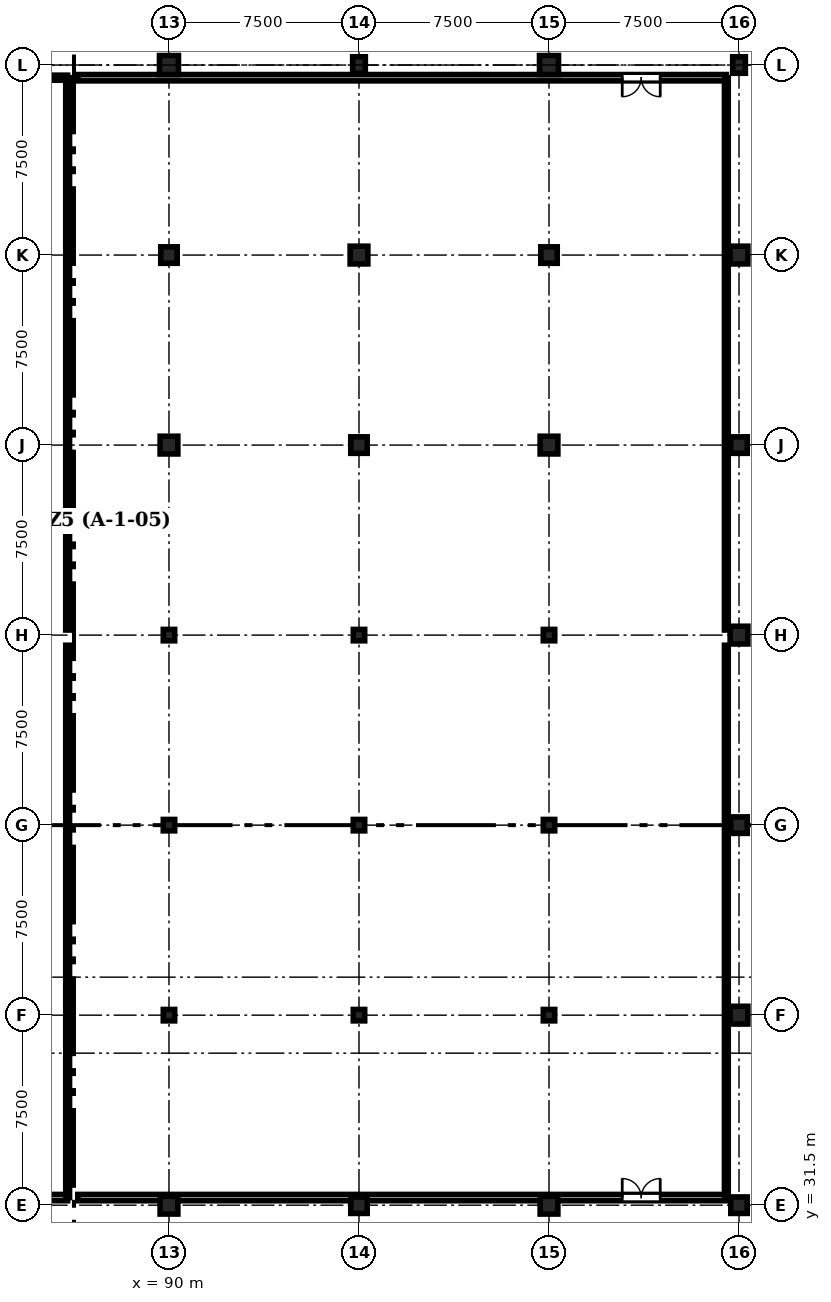
"""IFC4 building model, lengths in metres.
Left out: names, types, materials, properties, quantities, classifications, styles, units other than length and angle.
Written with IfcOpenShell. Run it as: python <this file> out.ifc"""

import sys

from ifc_helpers import new_model, si_unit, direction, frame, frame_2d, origin, origin_2d, place, context, subcontext, project, spatial, rectangle, extrude, element, fill, save


model = new_model("IFC4")
c1 = context("Model", 3, precision=1e-05, world=origin(), true_north=direction((0.0, 1.0)))
c2 = subcontext(c1, "Body", "Model", "MODEL_VIEW")
j1 = project(units=[si_unit("LENGTHUNIT", "METRE"), si_unit("PLANEANGLEUNIT", "RADIAN")], contexts=[c1])
p1 = place(None, origin())
s1 = spatial("IfcSite", under=j1, at=p1, CompositionType="ELEMENT")
p2 = place(p1, origin())
s2 = spatial("IfcBuilding", under=s1, at=p2, CompositionType="ELEMENT")
p3 = place(p2, frame((0.0, 0.0, -4.5)))
s3 = spatial("IfcBuildingStorey", under=s2, at=p3, CompositionType="ELEMENT", Elevation=-4.5)
p4 = place(p3, frame((90.0, 31.5, 0.0), z_axis=(0.0, 0.0, 1.0), x_axis=(1.0, 0.0, 0.0)))
e1 = element("IfcColumn", 1, at=p4, inside=s3, PredefinedType="COLUMN", context=c2, shape_type="SweptSolid", body=[
    extrude(rectangle(XDim=0.7, YDim=0.7, at=origin_2d()), origin(), (0.0, 0.0, 1.0), 4.5),
])
for number, where, z_axis, x_axis in (
    (2, (90.0, 39.0, 0.0), (0.0, 0.0, 1.0), (1.0, 0.0, 0.0)),
    (3, (90.0, 46.5, 0.0), (0.0, 0.0, 1.0), (1.0, 0.0, 0.0)),
    (4, (90.0, 54.0, 0.0), (0.0, 0.0, 1.0), (1.0, 0.0, 0.0)),
):
    element("IfcColumn", number, at=place(p3, frame(where, z_axis=z_axis, x_axis=x_axis)), inside=s3, PredefinedType="COLUMN", context=c2, shape_type="SweptSolid", body=[
        extrude(rectangle(XDim=0.45, YDim=0.45, at=origin_2d()), origin(), (0.0, 0.0, 1.0), 4.5),
    ])
p5 = place(p3, frame((90.0, 61.5, 0.0), z_axis=(0.0, 0.0, 1.0), x_axis=(1.0, 0.0, 0.0)))
e5 = element("IfcColumn", 5, at=p5, inside=s3, PredefinedType="COLUMN", context=c2, shape_type="SweptSolid", body=[
    extrude(rectangle(XDim=0.7, YDim=0.7, at=origin_2d()), origin(), (0.0, 0.0, 1.0), 4.5),
])
p6 = place(p3, frame((90.0, 69.0, 0.0), z_axis=(0.0, 0.0, 1.0), x_axis=(1.0, 0.0, 0.0)))
e6 = element("IfcColumn", 6, at=p6, inside=s3, PredefinedType="COLUMN", context=c2, shape_type="SweptSolid", body=[
    extrude(rectangle(XDim=0.65, YDim=0.65, at=origin_2d()), origin(), (0.0, 0.0, 1.0), 4.5),
])
p7 = place(p3, frame((90.0, 76.5, 0.0), z_axis=(0.0, 0.0, 1.0), x_axis=(1.0, 0.0, 0.0)))
e7 = element("IfcColumn", 7, at=p7, inside=s3, PredefinedType="COLUMN", context=c2, shape_type="SweptSolid", body=[
    extrude(rectangle(XDim=0.75, YDim=0.75, at=origin_2d()), origin(), (0.0, 0.0, 1.0), 4.5),
])
p8 = place(p3, frame((97.5, 31.5, 0.0), z_axis=(0.0, 0.0, 1.0), x_axis=(1.0, 0.0, 0.0)))
e8 = element("IfcColumn", 8, at=p8, inside=s3, PredefinedType="COLUMN", context=c2, shape_type="SweptSolid", body=[
    extrude(rectangle(XDim=0.65, YDim=0.65, at=origin_2d()), origin(), (0.0, 0.0, 1.0), 4.5),
])
for number, where, z_axis, x_axis in (
    (9, (97.5, 39.0, 0.0), (0.0, 0.0, 1.0), (1.0, 0.0, 0.0)),
    (10, (97.5, 46.5, 0.0), (0.0, 0.0, 1.0), (1.0, 0.0, 0.0)),
    (11, (97.5, 54.0, 0.0), (0.0, 0.0, 1.0), (1.0, 0.0, 0.0)),
):
    element("IfcColumn", number, at=place(p3, frame(where, z_axis=z_axis, x_axis=x_axis)), inside=s3, PredefinedType="COLUMN", context=c2, shape_type="SweptSolid", body=[
        extrude(rectangle(XDim=0.45, YDim=0.45, at=origin_2d()), origin(), (0.0, 0.0, 1.0), 4.5),
    ])
p9 = place(p3, frame((97.5, 61.5, 0.0), z_axis=(0.0, 0.0, 1.0), x_axis=(1.0, 0.0, 0.0)))
e12 = element("IfcColumn", 12, at=p9, inside=s3, PredefinedType="COLUMN", context=c2, shape_type="SweptSolid", body=[
    extrude(rectangle(XDim=0.65, YDim=0.65, at=origin_2d()), origin(), (0.0, 0.0, 1.0), 4.5),
])
p10 = place(p3, frame((97.5, 69.0, 0.0), z_axis=(0.0, 0.0, 1.0), x_axis=(1.0, 0.0, 0.0)))
e13 = element("IfcColumn", 13, at=p10, inside=s3, PredefinedType="COLUMN", context=c2, shape_type="SweptSolid", body=[
    extrude(rectangle(XDim=0.7, YDim=0.7, at=origin_2d()), origin(), (0.0, 0.0, 1.0), 4.5),
])
p11 = place(p3, frame((97.5, 76.5, 0.0), z_axis=(0.0, 0.0, 1.0), x_axis=(1.0, 0.0, 0.0)))
e14 = element("IfcColumn", 14, at=p11, inside=s3, PredefinedType="COLUMN", context=c2, shape_type="SweptSolid", body=[
    extrude(rectangle(XDim=0.5, YDim=0.65, at=origin_2d()), origin(), (0.0, 0.0, 1.0), 4.5),
])
p12 = place(p3, frame((105.0, 31.5, 0.0), z_axis=(0.0, 0.0, 1.0), x_axis=(1.0, 0.0, 0.0)))
e15 = element("IfcColumn", 15, at=p12, inside=s3, PredefinedType="COLUMN", context=c2, shape_type="SweptSolid", body=[
    extrude(rectangle(XDim=0.7, YDim=0.7, at=origin_2d()), origin(), (0.0, 0.0, 1.0), 4.5),
])
for number, where, z_axis, x_axis in (
    (16, (105.0, 39.0, 0.0), (0.0, 0.0, 1.0), (1.0, 0.0, 0.0)),
    (17, (105.0, 46.5, 0.0), (0.0, 0.0, 1.0), (1.0, 0.0, 0.0)),
    (18, (105.0, 54.0, 0.0), (0.0, 0.0, 1.0), (1.0, 0.0, 0.0)),
):
    element("IfcColumn", number, at=place(p3, frame(where, z_axis=z_axis, x_axis=x_axis)), inside=s3, PredefinedType="COLUMN", context=c2, shape_type="SweptSolid", body=[
        extrude(rectangle(XDim=0.45, YDim=0.45, at=origin_2d()), origin(), (0.0, 0.0, 1.0), 4.5),
    ])
p13 = place(p3, frame((105.0, 61.5, 0.0), z_axis=(0.0, 0.0, 1.0), x_axis=(1.0, 0.0, 0.0)))
e19 = element("IfcColumn", 19, at=p13, inside=s3, PredefinedType="COLUMN", context=c2, shape_type="SweptSolid", body=[
    extrude(rectangle(XDim=0.7, YDim=0.7, at=origin_2d()), origin(), (0.0, 0.0, 1.0), 4.5),
])
p14 = place(p3, frame((105.0, 69.0, 0.0), z_axis=(0.0, 0.0, 1.0), x_axis=(1.0, 0.0, 0.0)))
e20 = element("IfcColumn", 20, at=p14, inside=s3, PredefinedType="COLUMN", context=c2, shape_type="SweptSolid", body=[
    extrude(rectangle(XDim=0.65, YDim=0.65, at=origin_2d()), origin(), (0.0, 0.0, 1.0), 4.5),
])
p15 = place(p3, frame((105.0, 76.5, 0.0), z_axis=(0.0, 0.0, 1.0), x_axis=(1.0, 0.0, 0.0)))
e21 = element("IfcColumn", 21, at=p15, inside=s3, PredefinedType="COLUMN", context=c2, shape_type="SweptSolid", body=[
    extrude(rectangle(XDim=0.75, YDim=0.75, at=origin_2d()), origin(), (0.0, 0.0, 1.0), 4.5),
])
p16 = place(p3, frame((112.5, 31.5, 0.0), z_axis=(0.0, 0.0, 1.0), x_axis=(1.0, 0.0, 0.0)))
e22 = element("IfcColumn", 22, at=p16, inside=s3, PredefinedType="COLUMN", context=c2, shape_type="SweptSolid", body=[
    extrude(rectangle(XDim=0.65, YDim=0.65, at=origin_2d()), origin(), (0.0, 0.0, 1.0), 4.5),
])
p17 = place(p3, frame((112.5, 39.0, 0.0), z_axis=(0.0, 0.0, 1.0), x_axis=(1.0, 0.0, 0.0)))
e23 = element("IfcColumn", 23, at=p17, inside=s3, PredefinedType="COLUMN", context=c2, shape_type="SweptSolid", body=[
    extrude(rectangle(XDim=0.7, YDim=0.7, at=origin_2d()), origin(), (0.0, 0.0, 1.0), 4.5),
])
p18 = place(p3, frame((112.5, 46.5, 0.0), z_axis=(0.0, 0.0, 1.0), x_axis=(1.0, 0.0, 0.0)))
e24 = element("IfcColumn", 24, at=p18, inside=s3, PredefinedType="COLUMN", context=c2, shape_type="SweptSolid", body=[
    extrude(rectangle(XDim=0.65, YDim=0.65, at=origin_2d()), origin(), (0.0, 0.0, 1.0), 4.5),
])
p19 = place(p3, frame((112.5, 54.0, 0.0), z_axis=(0.0, 0.0, 1.0), x_axis=(1.0, 0.0, 0.0)))
e25 = element("IfcColumn", 25, at=p19, inside=s3, PredefinedType="COLUMN", context=c2, shape_type="SweptSolid", body=[
    extrude(rectangle(XDim=0.7, YDim=0.7, at=origin_2d()), origin(), (0.0, 0.0, 1.0), 4.5),
])
p20 = place(p3, frame((112.5, 61.5, 0.0), z_axis=(0.0, 0.0, 1.0), x_axis=(1.0, 0.0, 0.0)))
e26 = element("IfcColumn", 26, at=p20, inside=s3, PredefinedType="COLUMN", context=c2, shape_type="SweptSolid", body=[
    extrude(rectangle(XDim=0.65, YDim=0.65, at=origin_2d()), origin(), (0.0, 0.0, 1.0), 4.5),
])
p21 = place(p3, frame((112.5, 69.0, 0.0), z_axis=(0.0, 0.0, 1.0), x_axis=(1.0, 0.0, 0.0)))
e27 = element("IfcColumn", 27, at=p21, inside=s3, PredefinedType="COLUMN", context=c2, shape_type="SweptSolid", body=[
    extrude(rectangle(XDim=0.7, YDim=0.7, at=origin_2d()), origin(), (0.0, 0.0, 1.0), 4.5),
])
p22 = place(p3, frame((112.5, 76.5, 0.0), z_axis=(0.0, 0.0, 1.0), x_axis=(1.0, 0.0, 0.0)))
e28 = element("IfcColumn", 28, at=p22, inside=s3, PredefinedType="COLUMN", context=c2, shape_type="SweptSolid", body=[
    extrude(rectangle(XDim=0.5, YDim=0.65, at=origin_2d()), origin(), (0.0, 0.0, 1.0), 4.5),
])
p23 = place(p3, frame((60.5, 31.8, 0.0), z_axis=(0.0, 0.0, 1.0), x_axis=(1.0, 0.0, 0.0)))
e29 = element("IfcWall", 29, at=p23, inside=s3, PredefinedType="STANDARD", context=c2, shape_type="SweptSolid", body=[
    extrude(rectangle(XDim=25.5, YDim=0.25, at=frame_2d((12.75, 0.0))), origin(), (0.0, 0.0, 1.0), 3.475),
])
p24 = place(p23, frame((2.6, 0.0, 0.0)))
e30 = element("IfcOpeningElement", 30, at=p24, cuts=e29, PredefinedType="OPENING", context=c2, shape_type="SweptSolid", body=[
    extrude(rectangle(XDim=1.5, YDim=2.3, at=frame_2d((0.75, 1.15))), frame((0.0, 0.135, 0.0), z_axis=(0.0, -1.0, 0.0), x_axis=(1.0, 0.0, 0.0)), (0.0, 0.0, 1.0), 0.27),
])
p25 = place(p3, frame((86.4, 31.8, 0.0), z_axis=(0.0, 0.0, 1.0), x_axis=(1.0, 0.0, 0.0)))
e31 = element("IfcWall", 31, at=p25, inside=s3, PredefinedType="STANDARD", context=c2, shape_type="SweptSolid", body=[
    extrude(rectangle(XDim=25.6, YDim=0.25, at=frame_2d((12.8, 0.0))), origin(), (0.0, 0.0, 1.0), 3.475),
])
p26 = place(p25, frame((21.49, 0.0, 0.0)))
e32 = element("IfcOpeningElement", 32, at=p26, cuts=e31, PredefinedType="OPENING", context=c2, shape_type="SweptSolid", body=[
    extrude(rectangle(XDim=1.5, YDim=2.3, at=frame_2d((0.75, 1.15))), frame((0.0, 0.135, 0.0), z_axis=(0.0, -1.0, 0.0), x_axis=(1.0, 0.0, 0.0)), (0.0, 0.0, 1.0), 0.27),
])
p27 = place(p3, frame((86.0, 76.0, 0.0), z_axis=(0.0, 0.0, 1.0), x_axis=(-1.0, 0.0, 0.0)))
e33 = element("IfcWall", 33, at=p27, inside=s3, PredefinedType="STANDARD", context=c2, shape_type="SweptSolid", body=[
    extrude(rectangle(XDim=25.5, YDim=0.2, at=frame_2d((12.75, 0.0))), origin(), (0.0, 0.0, 1.0), 4.125),
])
p28 = place(p27, frame((21.805, 0.0, 0.0)))
e34 = element("IfcOpeningElement", 34, at=p28, cuts=e33, PredefinedType="OPENING", context=c2, shape_type="SweptSolid", body=[
    extrude(rectangle(XDim=1.05, YDim=2.2, at=frame_2d((0.525, 1.1))), frame((0.0, 0.11, 0.0), z_axis=(0.0, -1.0, 0.0), x_axis=(1.0, 0.0, 0.0)), (0.0, 0.0, 1.0), 0.22),
])
p29 = place(p3, frame((112.0, 76.0, 0.0), z_axis=(0.0, 0.0, 1.0), x_axis=(-1.0, 0.0, 0.0)))
e35 = element("IfcWall", 35, at=p29, inside=s3, PredefinedType="STANDARD", context=c2, shape_type="SweptSolid", body=[
    extrude(rectangle(XDim=25.6, YDim=0.25, at=frame_2d((12.8, 0.0))), origin(), (0.0, 0.0, 1.0), 4.125),
])
p30 = place(p29, frame((2.61, 0.0, 0.0)))
e36 = element("IfcOpeningElement", 36, at=p30, cuts=e35, PredefinedType="OPENING", context=c2, shape_type="SweptSolid", body=[
    extrude(rectangle(XDim=1.5, YDim=2.3, at=frame_2d((0.75, 1.15))), frame((0.0, 0.135, 0.0), z_axis=(0.0, -1.0, 0.0), x_axis=(1.0, 0.0, 0.0)), (0.0, 0.0, 1.0), 0.27),
])
p31 = place(p3, frame((86.0, 31.8, 0.0), z_axis=(0.0, 0.0, 1.0), x_axis=(0.0, 1.0, 0.0)))
e37 = element("IfcWall", 37, at=p31, inside=s3, PredefinedType="PARTITIONING", context=c2, shape_type="SweptSolid", body=[
    extrude(rectangle(XDim=21.8, YDim=0.15, at=frame_2d((10.9, 0.0))), origin(), (0.0, 0.0, 1.0), 3.725),
])
p32 = place(p3, frame((112.0, 31.8, 0.0), z_axis=(0.0, 0.0, 1.0), x_axis=(0.0, 1.0, 0.0)))
e38 = element("IfcWall", 38, at=p32, inside=s3, PredefinedType="PARTITIONING", context=c2, shape_type="SweptSolid", body=[
    extrude(rectangle(XDim=21.8, YDim=0.15, at=frame_2d((10.9, 0.0))), origin(), (0.0, 0.0, 1.0), 4.125),
])
p33 = place(p3, frame((86.0, 54.2, 0.0), z_axis=(0.0, 0.0, 1.0), x_axis=(0.0, 1.0, 0.0)))
e39 = element("IfcWall", 39, at=p33, inside=s3, PredefinedType="PARTITIONING", context=c2, shape_type="SweptSolid", body=[
    extrude(rectangle(XDim=21.8, YDim=0.15, at=frame_2d((10.9, 0.0))), origin(), (0.0, 0.0, 1.0), 3.725),
])
p34 = place(p3, frame((112.0, 54.2, 0.0), z_axis=(0.0, 0.0, 1.0), x_axis=(0.0, 1.0, 0.0)))
e40 = element("IfcWall", 40, at=p34, inside=s3, PredefinedType="PARTITIONING", context=c2, shape_type="SweptSolid", body=[
    extrude(rectangle(XDim=21.8, YDim=0.15, at=frame_2d((10.9, 0.0))), origin(), (0.0, 0.0, 1.0), 4.125),
])
p35 = place(p26, origin())
e41 = element("IfcDoor", 41, at=p35, inside=s3, OperationType="DOUBLE_DOOR_SINGLE_SWING", PredefinedType="DOOR", context=c2, shape_type="SweptSolid", body=[
    extrude(rectangle(XDim=1.5, YDim=2.3, at=frame_2d((0.75, 1.15))), frame((0.0, 0.025, 0.0), z_axis=(0.0, -1.0, 0.0), x_axis=(1.0, 0.0, 0.0)), (0.0, 0.0, 1.0), 0.05),
])
fill(e32, e41)
p36 = place(p30, origin())
e42 = element("IfcDoor", 42, at=p36, inside=s3, OperationType="DOUBLE_DOOR_SINGLE_SWING", PredefinedType="DOOR", context=c2, shape_type="SweptSolid", body=[
    extrude(rectangle(XDim=1.5, YDim=2.3, at=frame_2d((0.75, 1.15))), frame((0.0, 0.025, 0.0), z_axis=(0.0, -1.0, 0.0), x_axis=(1.0, 0.0, 0.0)), (0.0, 0.0, 1.0), 0.05),
])
fill(e36, e42)
save(model, sys.argv[1])
